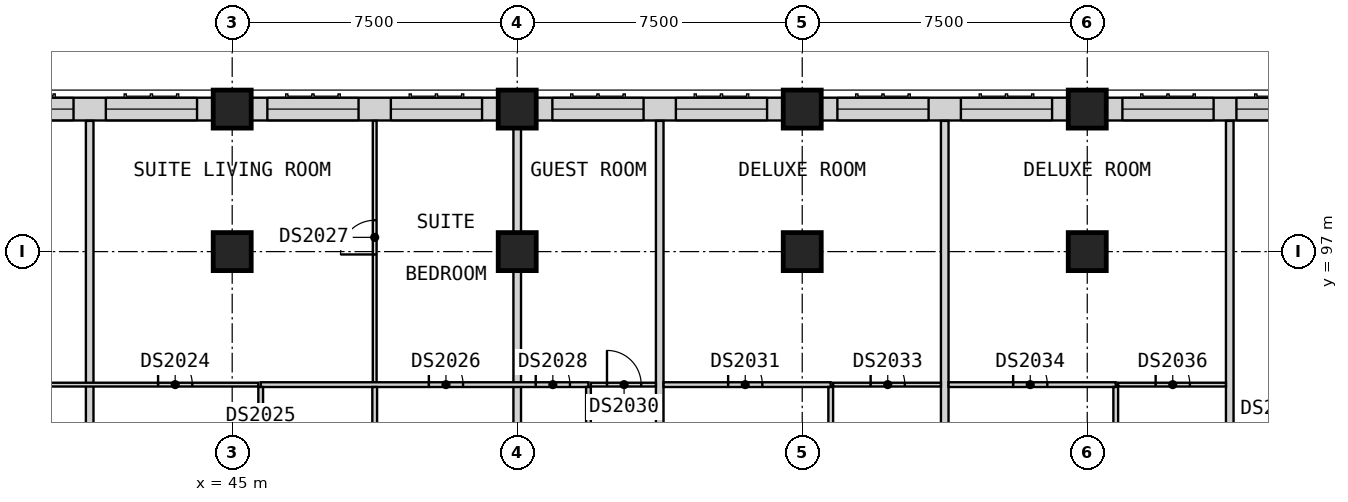
"""IFC4 building model, lengths in metres.
Left out: names, types, materials, properties, quantities, classifications, styles, units other than length and angle.
Written with IfcOpenShell. Run it as: python <this file> out.ifc"""

import sys

from ifc_helpers import new_model, si_unit, direction, frame, frame_2d, origin, origin_2d, place, context, subcontext, project, spatial, rectangle, extrude, element, fill, save


model = new_model("IFC4")
c1 = context("Model", 3, precision=1e-05, world=origin(), true_north=direction((0.0, 1.0)))
c2 = subcontext(c1, "Body", "Model", "MODEL_VIEW")
j1 = project(units=[si_unit("LENGTHUNIT", "METRE"), si_unit("PLANEANGLEUNIT", "RADIAN")], contexts=[c1])
p1 = place(None, origin())
s1 = spatial("IfcSite", under=j1, at=p1, CompositionType="ELEMENT")
p2 = place(p1, origin())
s2 = spatial("IfcBuilding", under=s1, at=p2, CompositionType="ELEMENT")
p3 = place(p2, frame((0.0, 0.0, 162.6)))
s3 = spatial("IfcBuildingStorey", under=s2, at=p3, CompositionType="ELEMENT", Elevation=162.6)
for number, where, z_axis, x_axis in (
    (1, (45.0, 100.75, 0.0), (0.0, 0.0, 1.0), (1.0, 0.0, 0.0)),
    (2, (52.5, 100.75, 0.0), (0.0, 0.0, 1.0), (1.0, 0.0, 0.0)),
    (3, (60.0, 100.75, 0.0), (0.0, 0.0, 1.0), (1.0, 0.0, 0.0)),
    (4, (67.5, 100.75, 0.0), (0.0, 0.0, 1.0), (1.0, 0.0, 0.0)),
    (5, (45.0, 97.0, 0.0), (0.0, 0.0, 1.0), (1.0, 0.0, 0.0)),
    (6, (52.5, 97.0, 0.0), (0.0, 0.0, 1.0), (1.0, 0.0, 0.0)),
    (7, (60.0, 97.0, 0.0), (0.0, 0.0, 1.0), (1.0, 0.0, 0.0)),
    (8, (67.5, 97.0, 0.0), (0.0, 0.0, 1.0), (1.0, 0.0, 0.0)),
):
    element("IfcColumn", number, at=place(p3, frame(where, z_axis=z_axis, x_axis=x_axis)), inside=s3, PredefinedType="COLUMN", context=c2, shape_type="SweptSolid", body=[
        extrude(rectangle(XDim=1.0, YDim=1.0, at=origin_2d()), origin(), (0.0, 0.0, 1.0), 3.6),
    ])
p4 = place(p3, frame((74.0, 100.75, 0.0), z_axis=(0.0, 0.0, 1.0), x_axis=(-1.0, 0.0, 0.0)))
e9 = element("IfcWall", 9, at=p4, inside=s3, PredefinedType="SOLIDWALL", context=c2, shape_type="SweptSolid", body=[
    extrude(rectangle(XDim=6.0, YDim=0.6, at=frame_2d((3.0, 0.0))), origin(), (0.0, 0.0, 1.0), 2.85),
])
p5 = place(p4, frame((3.175, 0.0, 0.8)))
e10 = element("IfcOpeningElement", 10, at=p5, cuts=e9, PredefinedType="OPENING", context=c2, shape_type="SweptSolid", body=[
    extrude(rectangle(XDim=2.4, YDim=1.8, at=frame_2d((1.2, 0.9))), frame((0.0, 0.31, 0.0), z_axis=(0.0, -1.0, 0.0), x_axis=(1.0, 0.0, 0.0)), (0.0, 0.0, 1.0), 0.62),
])
p6 = place(p4, frame((0.175, 0.0, 0.8)))
e11 = element("IfcOpeningElement", 11, at=p6, cuts=e9, PredefinedType="OPENING", context=c2, shape_type="SweptSolid", body=[
    extrude(rectangle(XDim=2.4, YDim=1.8, at=frame_2d((1.2, 0.9))), frame((0.0, 0.31, 0.0), z_axis=(0.0, -1.0, 0.0), x_axis=(1.0, 0.0, 0.0)), (0.0, 0.0, 1.0), 0.62),
])
p7 = place(p3, frame((67.0, 100.75, 0.0), z_axis=(0.0, 0.0, 1.0), x_axis=(-1.0, 0.0, 0.0)))
e12 = element("IfcWall", 12, at=p7, inside=s3, PredefinedType="SOLIDWALL", context=c2, shape_type="SweptSolid", body=[
    extrude(rectangle(XDim=6.5, YDim=0.6, at=frame_2d((3.25, 0.0))), origin(), (0.0, 0.0, 1.0), 2.85),
])
p8 = place(p7, frame((3.675, 0.0, 0.8)))
e13 = element("IfcOpeningElement", 13, at=p8, cuts=e12, PredefinedType="OPENING", context=c2, shape_type="SweptSolid", body=[
    extrude(rectangle(XDim=2.4, YDim=1.8, at=frame_2d((1.2, 0.9))), frame((0.0, 0.31, 0.0), z_axis=(0.0, -1.0, 0.0), x_axis=(1.0, 0.0, 0.0)), (0.0, 0.0, 1.0), 0.62),
])
p9 = place(p7, frame((0.425, 0.0, 0.8)))
e14 = element("IfcOpeningElement", 14, at=p9, cuts=e12, PredefinedType="OPENING", context=c2, shape_type="SweptSolid", body=[
    extrude(rectangle(XDim=2.4, YDim=1.8, at=frame_2d((1.2, 0.9))), frame((0.0, 0.31, 0.0), z_axis=(0.0, -1.0, 0.0), x_axis=(1.0, 0.0, 0.0)), (0.0, 0.0, 1.0), 0.62),
])
p10 = place(p3, frame((59.5, 100.75, 0.0), z_axis=(0.0, 0.0, 1.0), x_axis=(-1.0, 0.0, 0.0)))
e15 = element("IfcWall", 15, at=p10, inside=s3, PredefinedType="SOLIDWALL", context=c2, shape_type="SweptSolid", body=[
    extrude(rectangle(XDim=6.5, YDim=0.6, at=frame_2d((3.25, 0.0))), origin(), (0.0, 0.0, 1.0), 2.85),
])
p11 = place(p10, frame((3.675, 0.0, 0.8)))
e16 = element("IfcOpeningElement", 16, at=p11, cuts=e15, PredefinedType="OPENING", context=c2, shape_type="SweptSolid", body=[
    extrude(rectangle(XDim=2.4, YDim=1.8, at=frame_2d((1.2, 0.9))), frame((0.0, 0.31, 0.0), z_axis=(0.0, -1.0, 0.0), x_axis=(1.0, 0.0, 0.0)), (0.0, 0.0, 1.0), 0.62),
])
p12 = place(p10, frame((0.425, 0.0, 0.8)))
e17 = element("IfcOpeningElement", 17, at=p12, cuts=e15, PredefinedType="OPENING", context=c2, shape_type="SweptSolid", body=[
    extrude(rectangle(XDim=2.4, YDim=1.8, at=frame_2d((1.2, 0.9))), frame((0.0, 0.31, 0.0), z_axis=(0.0, -1.0, 0.0), x_axis=(1.0, 0.0, 0.0)), (0.0, 0.0, 1.0), 0.62),
])
p13 = place(p3, frame((52.0, 100.75, 0.0), z_axis=(0.0, 0.0, 1.0), x_axis=(-1.0, 0.0, 0.0)))
e18 = element("IfcWall", 18, at=p13, inside=s3, PredefinedType="SOLIDWALL", context=c2, shape_type="SweptSolid", body=[
    extrude(rectangle(XDim=6.5, YDim=0.6, at=frame_2d((3.25, 0.0))), origin(), (0.0, 0.0, 1.0), 2.85),
])
p14 = place(p13, frame((3.675, 0.0, 0.8)))
e19 = element("IfcOpeningElement", 19, at=p14, cuts=e18, PredefinedType="OPENING", context=c2, shape_type="SweptSolid", body=[
    extrude(rectangle(XDim=2.4, YDim=1.8, at=frame_2d((1.2, 0.9))), frame((0.0, 0.31, 0.0), z_axis=(0.0, -1.0, 0.0), x_axis=(1.0, 0.0, 0.0)), (0.0, 0.0, 1.0), 0.62),
])
p15 = place(p13, frame((0.425, 0.0, 0.8)))
e20 = element("IfcOpeningElement", 20, at=p15, cuts=e18, PredefinedType="OPENING", context=c2, shape_type="SweptSolid", body=[
    extrude(rectangle(XDim=2.4, YDim=1.8, at=frame_2d((1.2, 0.9))), frame((0.0, 0.31, 0.0), z_axis=(0.0, -1.0, 0.0), x_axis=(1.0, 0.0, 0.0)), (0.0, 0.0, 1.0), 0.62),
])
p16 = place(p3, frame((44.5, 100.75, 0.0), z_axis=(0.0, 0.0, 1.0), x_axis=(-1.0, 0.0, 0.0)))
e21 = element("IfcWall", 21, at=p16, inside=s3, PredefinedType="SOLIDWALL", context=c2, shape_type="SweptSolid", body=[
    extrude(rectangle(XDim=6.5, YDim=0.6, at=frame_2d((3.25, 0.0))), origin(), (0.0, 0.0, 1.0), 2.85),
])
p17 = place(p16, frame((3.675, 0.0, 0.8)))
e22 = element("IfcOpeningElement", 22, at=p17, cuts=e21, PredefinedType="OPENING", context=c2, shape_type="SweptSolid", body=[
    extrude(rectangle(XDim=2.4, YDim=1.8, at=frame_2d((1.2, 0.9))), frame((0.0, 0.31, 0.0), z_axis=(0.0, -1.0, 0.0), x_axis=(1.0, 0.0, 0.0)), (0.0, 0.0, 1.0), 0.62),
])
p18 = place(p16, frame((0.425, 0.0, 0.8)))
e23 = element("IfcOpeningElement", 23, at=p18, cuts=e21, PredefinedType="OPENING", context=c2, shape_type="SweptSolid", body=[
    extrude(rectangle(XDim=2.4, YDim=1.8, at=frame_2d((1.2, 0.9))), frame((0.0, 0.31, 0.0), z_axis=(0.0, -1.0, 0.0), x_axis=(1.0, 0.0, 0.0)), (0.0, 0.0, 1.0), 0.62),
])
p19 = place(p3, frame((41.25, 88.725, 0.0), z_axis=(0.0, 0.0, 1.0), x_axis=(0.0, 1.0, 0.0)))
e24 = element("IfcWall", 24, at=p19, inside=s3, PredefinedType="PARTITIONING", context=c2, shape_type="SweptSolid", body=[
    extrude(rectangle(XDim=11.715, YDim=0.2, at=frame_2d((5.857, 0.0))), origin(), (0.0, 0.0, 1.0), 3.2),
])
p20 = place(p3, frame((52.5, 88.725, 0.0), z_axis=(0.0, 0.0, 1.0), x_axis=(0.0, 1.0, 0.0)))
e25 = element("IfcWall", 25, at=p20, inside=s3, PredefinedType="PARTITIONING", context=c2, shape_type="SweptSolid", body=[
    extrude(rectangle(XDim=12.525, YDim=0.2, at=frame_2d((6.262, 0.0))), origin(), (0.0, 0.0, 1.0), 3.2),
])
for number, where, z_axis, x_axis in (
    (26, (56.25, 88.725, 0.0), (0.0, 0.0, 1.0), (0.0, 1.0, 0.0)),
    (27, (63.75, 88.725, 0.0), (0.0, 0.0, 1.0), (0.0, 1.0, 0.0)),
    (28, (71.25, 88.725, 0.0), (0.0, 0.0, 1.0), (0.0, 1.0, 0.0)),
):
    element("IfcWall", number, at=place(p3, frame(where, z_axis=z_axis, x_axis=x_axis)), inside=s3, PredefinedType="PARTITIONING", context=c2, shape_type="SweptSolid", body=[
        extrude(rectangle(XDim=11.715, YDim=0.2, at=frame_2d((5.857, 0.0))), origin(), (0.0, 0.0, 1.0), 3.2),
    ])
p21 = place(p3, frame((33.812, 93.5, 0.0), z_axis=(0.0, 0.0, 1.0), x_axis=(1.0, 0.0, 0.0)))
e29 = element("IfcWall", 29, at=p21, inside=s3, PredefinedType="PARTITIONING", context=c2, shape_type="SweptSolid", body=[
    extrude(rectangle(XDim=11.875, YDim=0.1, at=frame_2d((5.938, 0.0))), origin(), (0.0, 0.0, 1.0), 3.2),
])
p22 = place(p21, frame((5.113, 0.0, 0.0)))
e30 = element("IfcOpeningElement", 30, at=p22, cuts=e29, PredefinedType="OPENING", context=c2, shape_type="SweptSolid", body=[
    extrude(rectangle(XDim=0.9, YDim=2.1, at=frame_2d((0.45, 1.05))), frame((0.0, 0.06, 0.0), z_axis=(0.0, -1.0, 0.0), x_axis=(1.0, 0.0, 0.0)), (0.0, 0.0, 1.0), 0.12),
])
p23 = place(p21, frame((9.238, 0.0, 0.0)))
e31 = element("IfcOpeningElement", 31, at=p23, cuts=e29, PredefinedType="OPENING", context=c2, shape_type="SweptSolid", body=[
    extrude(rectangle(XDim=0.9, YDim=2.1, at=frame_2d((0.45, 1.05))), frame((0.0, 0.06, 0.0), z_axis=(0.0, -1.0, 0.0), x_axis=(1.0, 0.0, 0.0)), (0.0, 0.0, 1.0), 0.12),
])
p24 = place(p3, frame((54.438, 93.5, 0.0), z_axis=(0.0, 0.0, 1.0), x_axis=(1.0, 0.0, 0.0)))
e32 = element("IfcWall", 32, at=p24, inside=s3, PredefinedType="PARTITIONING", context=c2, shape_type="SweptSolid", body=[
    extrude(rectangle(XDim=1.712, YDim=0.1, at=frame_2d((0.856, 0.0))), origin(), (0.0, 0.0, 1.0), 3.2),
])
p25 = place(p24, frame((0.425, 0.0, 0.0)))
e33 = element("IfcOpeningElement", 33, at=p25, cuts=e32, PredefinedType="OPENING", context=c2, shape_type="SweptSolid", body=[
    extrude(rectangle(XDim=0.9, YDim=2.1, at=frame_2d((0.45, 1.05))), frame((0.0, 0.06, 0.0), z_axis=(0.0, -1.0, 0.0), x_axis=(1.0, 0.0, 0.0)), (0.0, 0.0, 1.0), 0.12),
])
p26 = place(p3, frame((60.812, 93.5, 0.0), z_axis=(0.0, 0.0, 1.0), x_axis=(1.0, 0.0, 0.0)))
e34 = element("IfcWall", 34, at=p26, inside=s3, PredefinedType="PARTITIONING", context=c2, shape_type="SweptSolid", body=[
    extrude(rectangle(XDim=2.837, YDim=0.1, at=frame_2d((1.419, 0.0))), origin(), (0.0, 0.0, 1.0), 3.2),
])
p27 = place(p26, frame((0.988, 0.0, 0.0)))
e35 = element("IfcOpeningElement", 35, at=p27, cuts=e34, PredefinedType="OPENING", context=c2, shape_type="SweptSolid", body=[
    extrude(rectangle(XDim=0.9, YDim=2.1, at=frame_2d((0.45, 1.05))), frame((0.0, 0.06, 0.0), z_axis=(0.0, -1.0, 0.0), x_axis=(1.0, 0.0, 0.0)), (0.0, 0.0, 1.0), 0.12),
])
p28 = place(p3, frame((68.312, 93.5, 0.0), z_axis=(0.0, 0.0, 1.0), x_axis=(1.0, 0.0, 0.0)))
e36 = element("IfcWall", 36, at=p28, inside=s3, PredefinedType="PARTITIONING", context=c2, shape_type="SweptSolid", body=[
    extrude(rectangle(XDim=2.837, YDim=0.1, at=frame_2d((1.419, 0.0))), origin(), (0.0, 0.0, 1.0), 3.2),
])
p29 = place(p28, frame((0.988, 0.0, 0.0)))
e37 = element("IfcOpeningElement", 37, at=p29, cuts=e36, PredefinedType="OPENING", context=c2, shape_type="SweptSolid", body=[
    extrude(rectangle(XDim=0.9, YDim=2.1, at=frame_2d((0.45, 1.05))), frame((0.0, 0.06, 0.0), z_axis=(0.0, -1.0, 0.0), x_axis=(1.0, 0.0, 0.0)), (0.0, 0.0, 1.0), 0.12),
])
p30 = place(p3, frame((48.75, 93.562, 0.0), z_axis=(0.0, 0.0, 1.0), x_axis=(0.0, 1.0, 0.0)))
e38 = element("IfcWall", 38, at=p30, inside=s3, PredefinedType="PARTITIONING", context=c2, shape_type="SweptSolid", body=[
    extrude(rectangle(XDim=6.877, YDim=0.1, at=frame_2d((3.439, 0.0))), origin(), (0.0, 0.0, 1.0), 3.2),
])
p31 = place(p30, frame((3.363, 0.0, 0.0)))
e39 = element("IfcOpeningElement", 39, at=p31, cuts=e38, PredefinedType="OPENING", context=c2, shape_type="SweptSolid", body=[
    extrude(rectangle(XDim=0.9, YDim=2.1, at=frame_2d((0.45, 1.05))), frame((0.0, 0.06, 0.0), z_axis=(0.0, -1.0, 0.0), x_axis=(1.0, 0.0, 0.0)), (0.0, 0.0, 1.0), 0.12),
])
p32 = place(p3, frame((45.75, 93.5, 0.0), z_axis=(0.0, 0.0, 1.0), x_axis=(1.0, 0.0, 0.0)))
e40 = element("IfcWall", 40, at=p32, inside=s3, PredefinedType="PARTITIONING", context=c2, shape_type="SweptSolid", body=[
    extrude(rectangle(XDim=8.625, YDim=0.125, at=frame_2d((4.312, 0.0))), origin(), (0.0, 0.0, 1.0), 3.2),
])
p33 = place(p32, frame((4.425, 0.0, 0.0)))
e41 = element("IfcOpeningElement", 41, at=p33, cuts=e40, PredefinedType="OPENING", context=c2, shape_type="SweptSolid", body=[
    extrude(rectangle(XDim=0.9, YDim=2.1, at=frame_2d((0.45, 1.05))), frame((0.0, 0.073, 0.0), z_axis=(0.0, -1.0, 0.0), x_axis=(1.0, 0.0, 0.0)), (0.0, 0.0, 1.0), 0.145),
])
p34 = place(p32, frame((7.238, 0.0, 0.0)))
e42 = element("IfcOpeningElement", 42, at=p34, cuts=e40, PredefinedType="OPENING", context=c2, shape_type="SweptSolid", body=[
    extrude(rectangle(XDim=0.9, YDim=2.1, at=frame_2d((0.45, 1.05))), frame((0.0, 0.073, 0.0), z_axis=(0.0, -1.0, 0.0), x_axis=(1.0, 0.0, 0.0)), (0.0, 0.0, 1.0), 0.145),
])
p35 = place(p3, frame((56.35, 93.5, 0.0), z_axis=(0.0, 0.0, 1.0), x_axis=(1.0, 0.0, 0.0)))
e43 = element("IfcWall", 43, at=p35, inside=s3, PredefinedType="PARTITIONING", context=c2, shape_type="SweptSolid", body=[
    extrude(rectangle(XDim=4.4, YDim=0.125, at=frame_2d((2.2, 0.0))), origin(), (0.0, 0.0, 1.0), 3.2),
])
p36 = place(p35, frame((1.7, 0.0, 0.0)))
e44 = element("IfcOpeningElement", 44, at=p36, cuts=e43, PredefinedType="OPENING", context=c2, shape_type="SweptSolid", body=[
    extrude(rectangle(XDim=0.9, YDim=2.1, at=frame_2d((0.45, 1.05))), frame((0.0, 0.073, 0.0), z_axis=(0.0, -1.0, 0.0), x_axis=(1.0, 0.0, 0.0)), (0.0, 0.0, 1.0), 0.145),
])
p37 = place(p3, frame((63.85, 93.5, 0.0), z_axis=(0.0, 0.0, 1.0), x_axis=(1.0, 0.0, 0.0)))
e45 = element("IfcWall", 45, at=p37, inside=s3, PredefinedType="PARTITIONING", context=c2, shape_type="SweptSolid", body=[
    extrude(rectangle(XDim=4.4, YDim=0.125, at=frame_2d((2.2, 0.0))), origin(), (0.0, 0.0, 1.0), 3.2),
])
p38 = place(p37, frame((1.7, 0.0, 0.0)))
e46 = element("IfcOpeningElement", 46, at=p38, cuts=e45, PredefinedType="OPENING", context=c2, shape_type="SweptSolid", body=[
    extrude(rectangle(XDim=0.9, YDim=2.1, at=frame_2d((0.45, 1.05))), frame((0.0, 0.073, 0.0), z_axis=(0.0, -1.0, 0.0), x_axis=(1.0, 0.0, 0.0)), (0.0, 0.0, 1.0), 0.145),
])
p39 = place(p3, frame((45.75, 88.725, 0.0), z_axis=(0.0, 0.0, 1.0), x_axis=(0.0, 1.0, 0.0)))
e47 = element("IfcWall", 47, at=p39, inside=s3, PredefinedType="PARTITIONING", context=c2, shape_type="SweptSolid", body=[
    extrude(rectangle(XDim=4.712, YDim=0.125, at=frame_2d((2.356, 0.0))), origin(), (0.0, 0.0, 1.0), 3.2),
])
p40 = place(p39, frame((1.9, 0.0, 0.0)))
e48 = element("IfcOpeningElement", 48, at=p40, cuts=e47, PredefinedType="OPENING", context=c2, shape_type="SweptSolid", body=[
    extrude(rectangle(XDim=0.9, YDim=2.1, at=frame_2d((0.45, 1.05))), frame((0.0, 0.073, 0.0), z_axis=(0.0, -1.0, 0.0), x_axis=(1.0, 0.0, 0.0)), (0.0, 0.0, 1.0), 0.145),
])
for number, where, z_axis, x_axis in (
    (49, (48.75, 88.725, 0.0), (0.0, 0.0, 1.0), (0.0, 1.0, 0.0)),
    (50, (54.375, 88.725, 0.0), (0.0, 0.0, 1.0), (0.0, 1.0, 0.0)),
    (51, (60.75, 88.725, 0.0), (0.0, 0.0, 1.0), (0.0, 1.0, 0.0)),
    (52, (68.25, 88.725, 0.0), (0.0, 0.0, 1.0), (0.0, 1.0, 0.0)),
):
    element("IfcWall", number, at=place(p3, frame(where, z_axis=z_axis, x_axis=x_axis)), inside=s3, PredefinedType="PARTITIONING", context=c2, shape_type="SweptSolid", body=[
        extrude(rectangle(XDim=4.712, YDim=0.125, at=frame_2d((2.356, 0.0))), origin(), (0.0, 0.0, 1.0), 3.2),
    ])
p41 = place(p5, origin())
e53 = element("IfcWindow", 53, at=p41, inside=s3, PartitioningType="SINGLE_PANEL", PredefinedType="WINDOW", context=c2, shape_type="SweptSolid", body=[
    extrude(rectangle(XDim=2.4, YDim=1.8, at=frame_2d((1.2, 0.9))), frame((0.0, -0.07, 0.0), z_axis=(0.0, -1.0, 0.0), x_axis=(1.0, 0.0, 0.0)), (0.0, 0.0, 1.0), 0.06),
])
fill(e10, e53)
p42 = place(p6, origin())
e54 = element("IfcWindow", 54, at=p42, inside=s3, PartitioningType="SINGLE_PANEL", PredefinedType="WINDOW", context=c2, shape_type="SweptSolid", body=[
    extrude(rectangle(XDim=2.4, YDim=1.8, at=frame_2d((1.2, 0.9))), frame((0.0, -0.07, 0.0), z_axis=(0.0, -1.0, 0.0), x_axis=(1.0, 0.0, 0.0)), (0.0, 0.0, 1.0), 0.06),
])
fill(e11, e54)
p43 = place(p8, origin())
e55 = element("IfcWindow", 55, at=p43, inside=s3, PartitioningType="SINGLE_PANEL", PredefinedType="WINDOW", context=c2, shape_type="SweptSolid", body=[
    extrude(rectangle(XDim=2.4, YDim=1.8, at=frame_2d((1.2, 0.9))), frame((0.0, -0.07, 0.0), z_axis=(0.0, -1.0, 0.0), x_axis=(1.0, 0.0, 0.0)), (0.0, 0.0, 1.0), 0.06),
])
fill(e13, e55)
p44 = place(p9, origin())
e56 = element("IfcWindow", 56, at=p44, inside=s3, PartitioningType="SINGLE_PANEL", PredefinedType="WINDOW", context=c2, shape_type="SweptSolid", body=[
    extrude(rectangle(XDim=2.4, YDim=1.8, at=frame_2d((1.2, 0.9))), frame((0.0, -0.07, 0.0), z_axis=(0.0, -1.0, 0.0), x_axis=(1.0, 0.0, 0.0)), (0.0, 0.0, 1.0), 0.06),
])
fill(e14, e56)
p45 = place(p11, origin())
e57 = element("IfcWindow", 57, at=p45, inside=s3, PartitioningType="SINGLE_PANEL", PredefinedType="WINDOW", context=c2, shape_type="SweptSolid", body=[
    extrude(rectangle(XDim=2.4, YDim=1.8, at=frame_2d((1.2, 0.9))), frame((0.0, -0.07, 0.0), z_axis=(0.0, -1.0, 0.0), x_axis=(1.0, 0.0, 0.0)), (0.0, 0.0, 1.0), 0.06),
])
fill(e16, e57)
p46 = place(p12, origin())
e58 = element("IfcWindow", 58, at=p46, inside=s3, PartitioningType="SINGLE_PANEL", PredefinedType="WINDOW", context=c2, shape_type="SweptSolid", body=[
    extrude(rectangle(XDim=2.4, YDim=1.8, at=frame_2d((1.2, 0.9))), frame((0.0, -0.07, 0.0), z_axis=(0.0, -1.0, 0.0), x_axis=(1.0, 0.0, 0.0)), (0.0, 0.0, 1.0), 0.06),
])
fill(e17, e58)
p47 = place(p14, origin())
e59 = element("IfcWindow", 59, at=p47, inside=s3, PartitioningType="SINGLE_PANEL", PredefinedType="WINDOW", context=c2, shape_type="SweptSolid", body=[
    extrude(rectangle(XDim=2.4, YDim=1.8, at=frame_2d((1.2, 0.9))), frame((0.0, -0.07, 0.0), z_axis=(0.0, -1.0, 0.0), x_axis=(1.0, 0.0, 0.0)), (0.0, 0.0, 1.0), 0.06),
])
fill(e19, e59)
p48 = place(p15, origin())
e60 = element("IfcWindow", 60, at=p48, inside=s3, PartitioningType="SINGLE_PANEL", PredefinedType="WINDOW", context=c2, shape_type="SweptSolid", body=[
    extrude(rectangle(XDim=2.4, YDim=1.8, at=frame_2d((1.2, 0.9))), frame((0.0, -0.07, 0.0), z_axis=(0.0, -1.0, 0.0), x_axis=(1.0, 0.0, 0.0)), (0.0, 0.0, 1.0), 0.06),
])
fill(e20, e60)
p49 = place(p17, origin())
e61 = element("IfcWindow", 61, at=p49, inside=s3, PartitioningType="SINGLE_PANEL", PredefinedType="WINDOW", context=c2, shape_type="SweptSolid", body=[
    extrude(rectangle(XDim=2.4, YDim=1.8, at=frame_2d((1.2, 0.9))), frame((0.0, -0.07, 0.0), z_axis=(0.0, -1.0, 0.0), x_axis=(1.0, 0.0, 0.0)), (0.0, 0.0, 1.0), 0.06),
])
fill(e22, e61)
p50 = place(p18, origin())
e62 = element("IfcWindow", 62, at=p50, inside=s3, PartitioningType="SINGLE_PANEL", PredefinedType="WINDOW", context=c2, shape_type="SweptSolid", body=[
    extrude(rectangle(XDim=2.4, YDim=1.8, at=frame_2d((1.2, 0.9))), frame((0.0, -0.07, 0.0), z_axis=(0.0, -1.0, 0.0), x_axis=(1.0, 0.0, 0.0)), (0.0, 0.0, 1.0), 0.06),
])
fill(e23, e62)
p51 = place(p23, origin())
e63 = element("IfcDoor", 63, at=p51, inside=s3, OperationType="SINGLE_SWING_RIGHT", PredefinedType="DOOR", context=c2, shape_type="SweptSolid", body=[
    extrude(rectangle(XDim=0.9, YDim=2.1, at=frame_2d((0.45, 1.05))), frame((0.0, 0.025, 0.0), z_axis=(0.0, -1.0, 0.0), x_axis=(1.0, 0.0, 0.0)), (0.0, 0.0, 1.0), 0.05),
])
fill(e31, e63)
p52 = place(p33, origin())
e64 = element("IfcDoor", 64, at=p52, inside=s3, OperationType="SINGLE_SWING_RIGHT", PredefinedType="DOOR", context=c2, shape_type="SweptSolid", body=[
    extrude(rectangle(XDim=0.9, YDim=2.1, at=frame_2d((0.45, 1.05))), frame((0.0, 0.025, 0.0), z_axis=(0.0, -1.0, 0.0), x_axis=(1.0, 0.0, 0.0)), (0.0, 0.0, 1.0), 0.05),
])
fill(e41, e64)
p53 = place(p31, origin())
e65 = element("IfcDoor", 65, at=p53, inside=s3, OperationType="SINGLE_SWING_LEFT", PredefinedType="DOOR", context=c2, shape_type="SweptSolid", body=[
    extrude(rectangle(XDim=0.9, YDim=2.1, at=frame_2d((0.45, 1.05))), frame((0.0, 0.025, 0.0), z_axis=(0.0, -1.0, 0.0), x_axis=(1.0, 0.0, 0.0)), (0.0, 0.0, 1.0), 0.05),
])
fill(e39, e65)
p54 = place(p34, origin())
e66 = element("IfcDoor", 66, at=p54, inside=s3, OperationType="SINGLE_SWING_RIGHT", PredefinedType="DOOR", context=c2, shape_type="SweptSolid", body=[
    extrude(rectangle(XDim=0.9, YDim=2.1, at=frame_2d((0.45, 1.05))), frame((0.0, 0.025, 0.0), z_axis=(0.0, -1.0, 0.0), x_axis=(1.0, 0.0, 0.0)), (0.0, 0.0, 1.0), 0.05),
])
fill(e42, e66)
p55 = place(p25, origin())
e67 = element("IfcDoor", 67, at=p55, inside=s3, OperationType="SINGLE_SWING_RIGHT", PredefinedType="DOOR", context=c2, shape_type="SweptSolid", body=[
    extrude(rectangle(XDim=0.9, YDim=2.1, at=frame_2d((0.45, 1.05))), frame((0.0, 0.025, 0.0), z_axis=(0.0, -1.0, 0.0), x_axis=(1.0, 0.0, 0.0)), (0.0, 0.0, 1.0), 0.05),
])
fill(e33, e67)
p56 = place(p36, origin())
e68 = element("IfcDoor", 68, at=p56, inside=s3, OperationType="SINGLE_SWING_RIGHT", PredefinedType="DOOR", context=c2, shape_type="SweptSolid", body=[
    extrude(rectangle(XDim=0.9, YDim=2.1, at=frame_2d((0.45, 1.05))), frame((0.0, 0.025, 0.0), z_axis=(0.0, -1.0, 0.0), x_axis=(1.0, 0.0, 0.0)), (0.0, 0.0, 1.0), 0.05),
])
fill(e44, e68)
p57 = place(p27, origin())
e69 = element("IfcDoor", 69, at=p57, inside=s3, OperationType="SINGLE_SWING_RIGHT", PredefinedType="DOOR", context=c2, shape_type="SweptSolid", body=[
    extrude(rectangle(XDim=0.9, YDim=2.1, at=frame_2d((0.45, 1.05))), frame((0.0, 0.025, 0.0), z_axis=(0.0, -1.0, 0.0), x_axis=(1.0, 0.0, 0.0)), (0.0, 0.0, 1.0), 0.05),
])
fill(e35, e69)
p58 = place(p38, origin())
e70 = element("IfcDoor", 70, at=p58, inside=s3, OperationType="SINGLE_SWING_RIGHT", PredefinedType="DOOR", context=c2, shape_type="SweptSolid", body=[
    extrude(rectangle(XDim=0.9, YDim=2.1, at=frame_2d((0.45, 1.05))), frame((0.0, 0.025, 0.0), z_axis=(0.0, -1.0, 0.0), x_axis=(1.0, 0.0, 0.0)), (0.0, 0.0, 1.0), 0.05),
])
fill(e46, e70)
p59 = place(p29, origin())
e71 = element("IfcDoor", 71, at=p59, inside=s3, OperationType="SINGLE_SWING_RIGHT", PredefinedType="DOOR", context=c2, shape_type="SweptSolid", body=[
    extrude(rectangle(XDim=0.9, YDim=2.1, at=frame_2d((0.45, 1.05))), frame((0.0, 0.025, 0.0), z_axis=(0.0, -1.0, 0.0), x_axis=(1.0, 0.0, 0.0)), (0.0, 0.0, 1.0), 0.05),
])
fill(e37, e71)
save(model, sys.argv[1])
